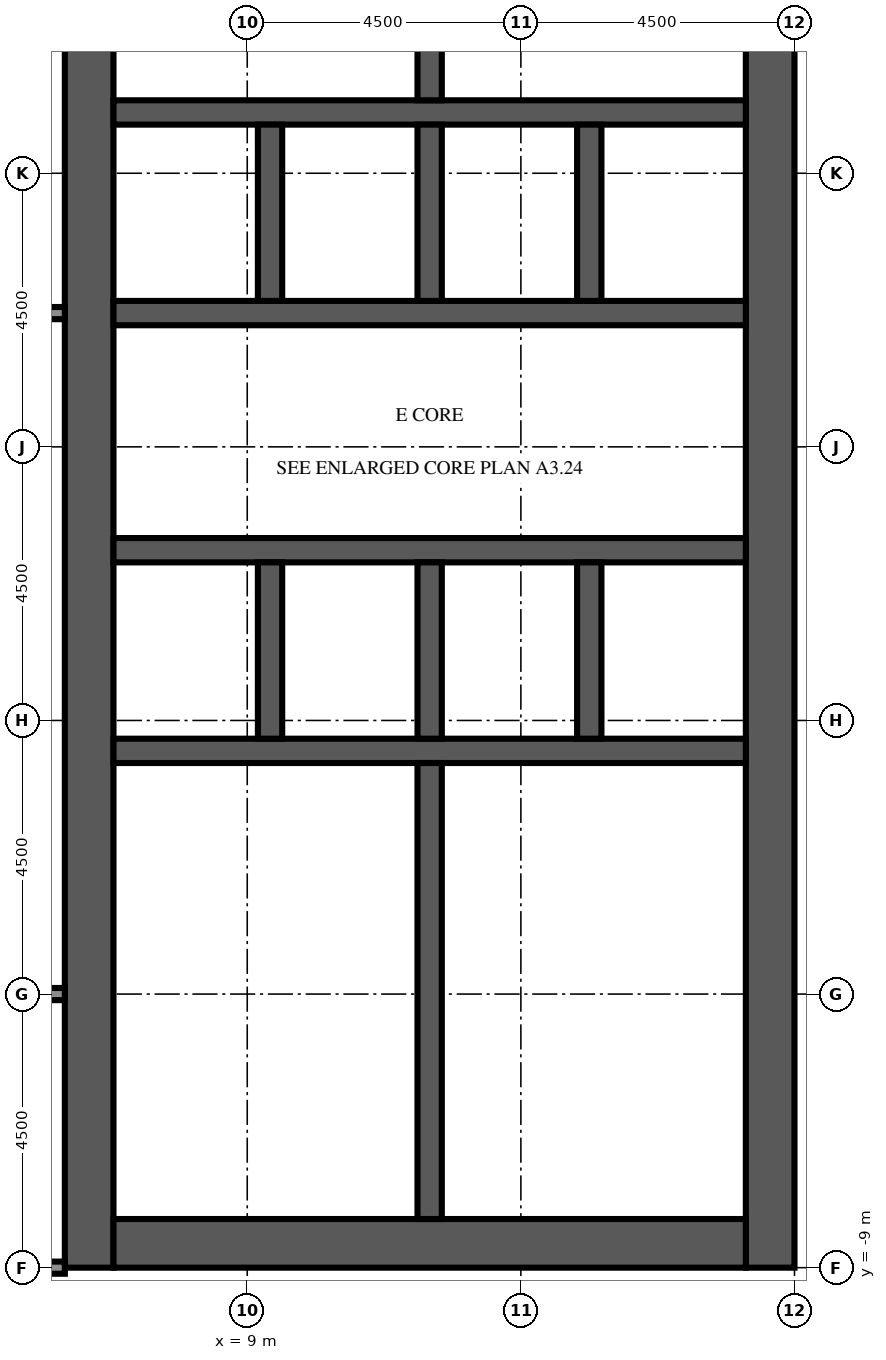
"""IFC4 building model, lengths in metres.
Left out: names, types, materials, properties, quantities, classifications, styles, units other than length and angle.
Written with IfcOpenShell. Run it as: python <this file> out.ifc"""

import sys

from ifc_helpers import new_model, si_unit, direction, frame, frame_2d, origin, place, context, subcontext, project, spatial, rectangle, extrude, element, fill, save


model = new_model("IFC4")
c1 = context("Model", 3, precision=1e-05, world=origin(), true_north=direction((0.0, 1.0)))
c2 = subcontext(c1, "Body", "Model", "MODEL_VIEW")
j1 = project(units=[si_unit("LENGTHUNIT", "METRE"), si_unit("PLANEANGLEUNIT", "RADIAN")], contexts=[c1])
p1 = place(None, origin())
s1 = spatial("IfcSite", under=j1, at=p1, CompositionType="ELEMENT")
p2 = place(p1, origin())
s2 = spatial("IfcBuilding", under=s1, at=p2, CompositionType="ELEMENT")
p3 = place(p2, frame((0.0, 0.0, 151.4)))
s3 = spatial("IfcBuildingStorey", under=s2, at=p3, CompositionType="ELEMENT", Elevation=151.4)
p4 = place(p3, frame((6.4, -9.0, 0.0), z_axis=(0.0, 0.0, 1.0), x_axis=(0.0, 1.0, 0.0)))
e1 = element("IfcWall", 1, at=p4, inside=s3, PredefinedType="SHEAR", context=c2, shape_type="SweptSolid", body=[
    extrude(rectangle(XDim=27.5, YDim=0.8, at=frame_2d((13.75, 0.0))), origin(), (0.0, 0.0, 1.0), 5.4),
])
p5 = place(p4, frame((12.55, 0.0, 0.0)))
e2 = element("IfcOpeningElement", 2, at=p5, cuts=e1, PredefinedType="OPENING", context=c2, shape_type="SweptSolid", body=[
    extrude(rectangle(XDim=2.4, YDim=2.4, at=frame_2d((1.2, 1.2))), frame((0.0, 0.41, 0.0), z_axis=(0.0, -1.0, 0.0), x_axis=(1.0, 0.0, 0.0)), (0.0, 0.0, 1.0), 0.82),
])
p6 = place(p4, frame((5.45, 0.0, 0.0)))
e3 = element("IfcOpeningElement", 3, at=p6, cuts=e1, PredefinedType="OPENING", context=c2, shape_type="SweptSolid", body=[
    extrude(rectangle(XDim=1.2, YDim=2.1, at=frame_2d((0.6, 1.05))), frame((0.0, 0.41, 0.0), z_axis=(0.0, -1.0, 0.0), x_axis=(1.0, 0.0, 0.0)), (0.0, 0.0, 1.0), 0.82),
])
p7 = place(p4, frame((19.45, 0.0, 0.0)))
e4 = element("IfcOpeningElement", 4, at=p7, cuts=e1, PredefinedType="OPENING", context=c2, shape_type="SweptSolid", body=[
    extrude(rectangle(XDim=1.0, YDim=2.1, at=frame_2d((0.5, 1.05))), frame((0.0, 0.41, 0.0), z_axis=(0.0, -1.0, 0.0), x_axis=(1.0, 0.0, 0.0)), (0.0, 0.0, 1.0), 0.82),
])
p8 = place(p4, frame((21.137, 0.0, 0.0)))
e5 = element("IfcOpeningElement", 5, at=p8, cuts=e1, PredefinedType="OPENING", context=c2, shape_type="SweptSolid", body=[
    extrude(rectangle(XDim=1.0, YDim=2.1, at=frame_2d((0.5, 1.05))), frame((0.0, 0.41, 0.0), z_axis=(0.0, -1.0, 0.0), x_axis=(1.0, 0.0, 0.0)), (0.0, 0.0, 1.0), 0.82),
])
p9 = place(p4, frame((23.2, 0.0, 0.0)))
e6 = element("IfcOpeningElement", 6, at=p9, cuts=e1, PredefinedType="OPENING", context=c2, shape_type="SweptSolid", body=[
    extrude(rectangle(XDim=1.0, YDim=2.1, at=frame_2d((0.5, 1.05))), frame((0.0, 0.41, 0.0), z_axis=(0.0, -1.0, 0.0), x_axis=(1.0, 0.0, 0.0)), (0.0, 0.0, 1.0), 0.82),
])
p10 = place(p4, frame((25.262, 0.0, 0.0)))
e7 = element("IfcOpeningElement", 7, at=p10, cuts=e1, PredefinedType="OPENING", context=c2, shape_type="SweptSolid", body=[
    extrude(rectangle(XDim=1.0, YDim=2.1, at=frame_2d((0.5, 1.05))), frame((0.0, 0.41, 0.0), z_axis=(0.0, -1.0, 0.0), x_axis=(1.0, 0.0, 0.0)), (0.0, 0.0, 1.0), 0.82),
])
p11 = place(p3, frame((17.6, -9.0, 0.0), z_axis=(0.0, 0.0, 1.0), x_axis=(0.0, 1.0, 0.0)))
e8 = element("IfcWall", 8, at=p11, inside=s3, PredefinedType="SHEAR", context=c2, shape_type="SweptSolid", body=[
    extrude(rectangle(XDim=27.5, YDim=0.8, at=frame_2d((13.75, 0.0))), origin(), (0.0, 0.0, 1.0), 5.4),
])
p12 = place(p11, frame((12.55, 0.0, 0.0)))
e9 = element("IfcOpeningElement", 9, at=p12, cuts=e8, PredefinedType="OPENING", context=c2, shape_type="SweptSolid", body=[
    extrude(rectangle(XDim=2.4, YDim=2.4, at=frame_2d((1.2, 1.2))), frame((0.0, 0.41, 0.0), z_axis=(0.0, -1.0, 0.0), x_axis=(1.0, 0.0, 0.0)), (0.0, 0.0, 1.0), 0.82),
])
p13 = place(p11, frame((6.825, 0.0, 0.0)))
e10 = element("IfcOpeningElement", 10, at=p13, cuts=e8, PredefinedType="OPENING", context=c2, shape_type="SweptSolid", body=[
    extrude(rectangle(XDim=1.2, YDim=2.1, at=frame_2d((0.6, 1.05))), frame((0.0, 0.41, 0.0), z_axis=(0.0, -1.0, 0.0), x_axis=(1.0, 0.0, 0.0)), (0.0, 0.0, 1.0), 0.82),
])
p14 = place(p11, frame((19.475, 0.0, 0.0)))
e11 = element("IfcOpeningElement", 11, at=p14, cuts=e8, PredefinedType="OPENING", context=c2, shape_type="SweptSolid", body=[
    extrude(rectangle(XDim=1.2, YDim=2.1, at=frame_2d((0.6, 1.05))), frame((0.0, 0.41, 0.0), z_axis=(0.0, -1.0, 0.0), x_axis=(1.0, 0.0, 0.0)), (0.0, 0.0, 1.0), 0.82),
])
p15 = place(p3, frame((6.8, -8.6, 0.0), z_axis=(0.0, 0.0, 1.0), x_axis=(1.0, 0.0, 0.0)))
e12 = element("IfcWall", 12, at=p15, inside=s3, PredefinedType="SHEAR", context=c2, shape_type="SweptSolid", body=[
    extrude(rectangle(XDim=10.4, YDim=0.8, at=frame_2d((5.2, 0.0))), origin(), (0.0, 0.0, 1.0), 5.4),
])
p16 = place(p3, frame((6.8, -0.5, 0.0), z_axis=(0.0, 0.0, 1.0), x_axis=(1.0, 0.0, 0.0)))
e13 = element("IfcWall", 13, at=p16, inside=s3, PredefinedType="SHEAR", context=c2, shape_type="SweptSolid", body=[
    extrude(rectangle(XDim=10.4, YDim=0.4, at=frame_2d((5.2, 0.0))), origin(), (0.0, 0.0, 1.0), 5.4),
])
p17 = place(p3, frame((6.8, 2.8, 0.0), z_axis=(0.0, 0.0, 1.0), x_axis=(1.0, 0.0, 0.0)))
e14 = element("IfcWall", 14, at=p17, inside=s3, PredefinedType="SHEAR", context=c2, shape_type="SweptSolid", body=[
    extrude(rectangle(XDim=10.4, YDim=0.4, at=frame_2d((5.2, 0.0))), origin(), (0.0, 0.0, 1.0), 5.4),
])
p18 = place(p17, frame((0.738, 0.0, 0.0)))
e15 = element("IfcOpeningElement", 15, at=p18, cuts=e14, PredefinedType="OPENING", context=c2, shape_type="SweptSolid", body=[
    extrude(rectangle(XDim=1.1, YDim=2.1, at=frame_2d((0.55, 1.05))), frame((0.0, 0.21, 0.0), z_axis=(0.0, -1.0, 0.0), x_axis=(1.0, 0.0, 0.0)), (0.0, 0.0, 1.0), 0.42),
])
p19 = place(p17, frame((3.337, 0.0, 0.0)))
e16 = element("IfcOpeningElement", 16, at=p19, cuts=e14, PredefinedType="OPENING", context=c2, shape_type="SweptSolid", body=[
    extrude(rectangle(XDim=1.1, YDim=2.1, at=frame_2d((0.55, 1.05))), frame((0.0, 0.21, 0.0), z_axis=(0.0, -1.0, 0.0), x_axis=(1.0, 0.0, 0.0)), (0.0, 0.0, 1.0), 0.42),
])
p20 = place(p17, frame((5.962, 0.0, 0.0)))
e17 = element("IfcOpeningElement", 17, at=p20, cuts=e14, PredefinedType="OPENING", context=c2, shape_type="SweptSolid", body=[
    extrude(rectangle(XDim=1.1, YDim=2.1, at=frame_2d((0.55, 1.05))), frame((0.0, 0.21, 0.0), z_axis=(0.0, -1.0, 0.0), x_axis=(1.0, 0.0, 0.0)), (0.0, 0.0, 1.0), 0.42),
])
p21 = place(p17, frame((8.613, 0.0, 0.0)))
e18 = element("IfcOpeningElement", 18, at=p21, cuts=e14, PredefinedType="OPENING", context=c2, shape_type="SweptSolid", body=[
    extrude(rectangle(XDim=1.0, YDim=2.1, at=frame_2d((0.5, 1.05))), frame((0.0, 0.21, 0.0), z_axis=(0.0, -1.0, 0.0), x_axis=(1.0, 0.0, 0.0)), (0.0, 0.0, 1.0), 0.42),
])
p22 = place(p3, frame((6.8, 6.7, 0.0), z_axis=(0.0, 0.0, 1.0), x_axis=(1.0, 0.0, 0.0)))
e19 = element("IfcWall", 19, at=p22, inside=s3, PredefinedType="SHEAR", context=c2, shape_type="SweptSolid", body=[
    extrude(rectangle(XDim=10.4, YDim=0.4, at=frame_2d((5.2, 0.0))), origin(), (0.0, 0.0, 1.0), 5.4),
])
p23 = place(p22, frame((3.337, 0.0, 0.0)))
e20 = element("IfcOpeningElement", 20, at=p23, cuts=e19, PredefinedType="OPENING", context=c2, shape_type="SweptSolid", body=[
    extrude(rectangle(XDim=1.1, YDim=2.1, at=frame_2d((0.55, 1.05))), frame((0.0, 0.21, 0.0), z_axis=(0.0, -1.0, 0.0), x_axis=(1.0, 0.0, 0.0)), (0.0, 0.0, 1.0), 0.42),
])
p24 = place(p22, frame((5.962, 0.0, 0.0)))
e21 = element("IfcOpeningElement", 21, at=p24, cuts=e19, PredefinedType="OPENING", context=c2, shape_type="SweptSolid", body=[
    extrude(rectangle(XDim=1.1, YDim=2.1, at=frame_2d((0.55, 1.05))), frame((0.0, 0.21, 0.0), z_axis=(0.0, -1.0, 0.0), x_axis=(1.0, 0.0, 0.0)), (0.0, 0.0, 1.0), 0.42),
])
p25 = place(p22, frame((8.663, 0.0, 0.0)))
e22 = element("IfcOpeningElement", 22, at=p25, cuts=e19, PredefinedType="OPENING", context=c2, shape_type="SweptSolid", body=[
    extrude(rectangle(XDim=1.1, YDim=2.1, at=frame_2d((0.55, 1.05))), frame((0.0, 0.21, 0.0), z_axis=(0.0, -1.0, 0.0), x_axis=(1.0, 0.0, 0.0)), (0.0, 0.0, 1.0), 0.42),
])
p26 = place(p22, frame((0.688, 0.0, 0.0)))
e23 = element("IfcOpeningElement", 23, at=p26, cuts=e19, PredefinedType="OPENING", context=c2, shape_type="SweptSolid", body=[
    extrude(rectangle(XDim=1.0, YDim=2.1, at=frame_2d((0.5, 1.05))), frame((0.0, 0.21, 0.0), z_axis=(0.0, -1.0, 0.0), x_axis=(1.0, 0.0, 0.0)), (0.0, 0.0, 1.0), 0.42),
])
p27 = place(p3, frame((6.8, 10.0, 0.0), z_axis=(0.0, 0.0, 1.0), x_axis=(1.0, 0.0, 0.0)))
e24 = element("IfcWall", 24, at=p27, inside=s3, PredefinedType="SHEAR", context=c2, shape_type="SweptSolid", body=[
    extrude(rectangle(XDim=10.4, YDim=0.4, at=frame_2d((5.2, 0.0))), origin(), (0.0, 0.0, 1.0), 5.4),
])
for number, where, z_axis, x_axis in (
    (25, (9.375, -0.3, 0.0), (0.0, 0.0, 1.0), (0.0, 1.0, 0.0)),
    (26, (9.375, 6.9, 0.0), (0.0, 0.0, 1.0), (0.0, 1.0, 0.0)),
    (27, (12.0, -0.3, 0.0), (0.0, 0.0, 1.0), (0.0, 1.0, 0.0)),
    (28, (12.0, 6.9, 0.0), (0.0, 0.0, 1.0), (0.0, 1.0, 0.0)),
    (29, (14.625, -0.3, 0.0), (0.0, 0.0, 1.0), (0.0, 1.0, 0.0)),
    (30, (14.625, 6.9, 0.0), (0.0, 0.0, 1.0), (0.0, 1.0, 0.0)),
):
    element("IfcWall", number, at=place(p3, frame(where, z_axis=z_axis, x_axis=x_axis)), inside=s3, PredefinedType="SHEAR", context=c2, shape_type="SweptSolid", body=[
        extrude(rectangle(XDim=2.9, YDim=0.4, at=frame_2d((1.45, 0.0))), origin(), (0.0, 0.0, 1.0), 5.4),
    ])
for number, where, z_axis, x_axis in (
    (31, (12.0, -8.2, 0.0), (0.0, 0.0, 1.0), (0.0, 1.0, 0.0)),
    (32, (12.0, 10.2, 0.0), (0.0, 0.0, 1.0), (0.0, 1.0, 0.0)),
):
    element("IfcWall", number, at=place(p3, frame(where, z_axis=z_axis, x_axis=x_axis)), inside=s3, PredefinedType="SHEAR", context=c2, shape_type="SweptSolid", body=[
        extrude(rectangle(XDim=7.5, YDim=0.4, at=frame_2d((3.75, 0.0))), origin(), (0.0, 0.0, 1.0), 5.4),
    ])
p28 = place(p3, frame((6.8, -5.2, 0.0), z_axis=(0.0, 0.0, 1.0), x_axis=(1.0, 0.0, 0.0)))
e33 = element("IfcWall", 33, at=p28, inside=s3, PredefinedType="PARTITIONING", context=c2, shape_type="SweptSolid", body=[
    extrude(rectangle(XDim=1.5, YDim=0.1, at=frame_2d((0.75, 0.0))), origin(), (0.0, 0.0, 1.0), 4.95),
])
p29 = place(p28, frame((0.25, 0.0, 0.0)))
e34 = element("IfcOpeningElement", 34, at=p29, cuts=e33, PredefinedType="OPENING", context=c2, shape_type="SweptSolid", body=[
    extrude(rectangle(XDim=1.0, YDim=2.1, at=frame_2d((0.5, 1.05))), frame((0.0, 0.06, 0.0), z_axis=(0.0, -1.0, 0.0), x_axis=(1.0, 0.0, 0.0)), (0.0, 0.0, 1.0), 0.12),
])
p30 = place(p3, frame((8.3, -5.2, 0.0), z_axis=(0.0, 0.0, 1.0), x_axis=(0.0, 1.0, 0.0)))
e35 = element("IfcWall", 35, at=p30, inside=s3, PredefinedType="PARTITIONING", context=c2, shape_type="SweptSolid", body=[
    extrude(rectangle(XDim=2.25, YDim=0.1, at=frame_2d((1.125, 0.0))), origin(), (0.0, 0.0, 1.0), 4.95),
])
p31 = place(p30, frame((0.625, 0.0, 0.0)))
e36 = element("IfcOpeningElement", 36, at=p31, cuts=e35, PredefinedType="OPENING", context=c2, shape_type="SweptSolid", body=[
    extrude(rectangle(XDim=1.0, YDim=2.1, at=frame_2d((0.5, 1.05))), frame((0.0, 0.06, 0.0), z_axis=(0.0, -1.0, 0.0), x_axis=(1.0, 0.0, 0.0)), (0.0, 0.0, 1.0), 0.12),
])
p32 = place(p3, frame((8.3, -2.95, 0.0), z_axis=(0.0, 0.0, 1.0), x_axis=(0.0, 1.0, 0.0)))
e37 = element("IfcWall", 37, at=p32, inside=s3, PredefinedType="PARTITIONING", context=c2, shape_type="SweptSolid", body=[
    extrude(rectangle(XDim=2.25, YDim=0.1, at=frame_2d((1.125, 0.0))), origin(), (0.0, 0.0, 1.0), 4.95),
])
p33 = place(p32, frame((0.625, 0.0, 0.0)))
e38 = element("IfcOpeningElement", 38, at=p33, cuts=e37, PredefinedType="OPENING", context=c2, shape_type="SweptSolid", body=[
    extrude(rectangle(XDim=1.0, YDim=2.1, at=frame_2d((0.5, 1.05))), frame((0.0, 0.06, 0.0), z_axis=(0.0, -1.0, 0.0), x_axis=(1.0, 0.0, 0.0)), (0.0, 0.0, 1.0), 0.12),
])
for number, where, z_axis, x_axis in (
    (39, (8.3, -5.2, 0.0), (0.0, 0.0, 1.0), (1.0, 0.0, 0.0)),
    (40, (8.3, -2.95, 0.0), (0.0, 0.0, 1.0), (1.0, 0.0, 0.0)),
):
    element("IfcWall", number, at=place(p3, frame(where, z_axis=z_axis, x_axis=x_axis)), inside=s3, PredefinedType="PARTITIONING", context=c2, shape_type="SweptSolid", body=[
        extrude(rectangle(XDim=3.5, YDim=0.1, at=frame_2d((1.75, 0.0))), origin(), (0.0, 0.0, 1.0), 4.95),
    ])
p34 = place(p3, frame((1.5, -9.0, 0.0), z_axis=(0.0, 0.0, 1.0), x_axis=(1.0, 0.0, 0.0)))
e41 = element("IfcWall", 41, at=p34, inside=s3, PredefinedType="PARTITIONING", context=c2, shape_type="SweptSolid", body=[
    extrude(rectangle(XDim=4.5, YDim=0.2, at=frame_2d((2.25, 0.0))), origin(), (0.0, 0.0, 1.0), 4.95),
])
p35 = place(p34, frame((1.85, 0.0, 0.0)))
e42 = element("IfcOpeningElement", 42, at=p35, cuts=e41, PredefinedType="OPENING", context=c2, shape_type="SweptSolid", body=[
    extrude(rectangle(XDim=1.0, YDim=2.1, at=frame_2d((0.5, 1.05))), frame((0.0, 0.11, 0.0), z_axis=(0.0, -1.0, 0.0), x_axis=(1.0, 0.0, 0.0)), (0.0, 0.0, 1.0), 0.22),
])
p36 = place(p3, frame((1.5, -4.5, 0.0), z_axis=(0.0, 0.0, 1.0), x_axis=(1.0, 0.0, 0.0)))
e43 = element("IfcWall", 43, at=p36, inside=s3, PredefinedType="PARTITIONING", context=c2, shape_type="SweptSolid", body=[
    extrude(rectangle(XDim=4.5, YDim=0.2, at=frame_2d((2.25, 0.0))), origin(), (0.0, 0.0, 1.0), 4.95),
])
p37 = place(p3, frame((1.5, 6.7, 0.0), z_axis=(0.0, 0.0, 1.0), x_axis=(1.0, 0.0, 0.0)))
e44 = element("IfcWall", 44, at=p37, inside=s3, PredefinedType="PARTITIONING", context=c2, shape_type="SweptSolid", body=[
    extrude(rectangle(XDim=4.5, YDim=0.2, at=frame_2d((2.25, 0.0))), origin(), (0.0, 0.0, 1.0), 4.95),
])
p38 = place(p37, frame((1.85, 0.0, 0.0)))
e45 = element("IfcOpeningElement", 45, at=p38, cuts=e44, PredefinedType="OPENING", context=c2, shape_type="SweptSolid", body=[
    extrude(rectangle(XDim=1.0, YDim=2.1, at=frame_2d((0.5, 1.05))), frame((0.0, 0.11, 0.0), z_axis=(0.0, -1.0, 0.0), x_axis=(1.0, 0.0, 0.0)), (0.0, 0.0, 1.0), 0.22),
])
p39 = place(p18, origin())
e46 = element("IfcDoor", 46, at=p39, inside=s3, OperationType="DOUBLE_DOOR_SLIDING", PredefinedType="DOOR", context=c2, shape_type="SweptSolid", body=[
    extrude(rectangle(XDim=1.1, YDim=2.1, at=frame_2d((0.55, 1.05))), frame((0.0, 0.025, 0.0), z_axis=(0.0, -1.0, 0.0), x_axis=(1.0, 0.0, 0.0)), (0.0, 0.0, 1.0), 0.05),
])
fill(e15, e46)
p40 = place(p19, origin())
e47 = element("IfcDoor", 47, at=p40, inside=s3, OperationType="DOUBLE_DOOR_SLIDING", PredefinedType="DOOR", context=c2, shape_type="SweptSolid", body=[
    extrude(rectangle(XDim=1.1, YDim=2.1, at=frame_2d((0.55, 1.05))), frame((0.0, 0.025, 0.0), z_axis=(0.0, -1.0, 0.0), x_axis=(1.0, 0.0, 0.0)), (0.0, 0.0, 1.0), 0.05),
])
fill(e16, e47)
p41 = place(p20, origin())
e48 = element("IfcDoor", 48, at=p41, inside=s3, OperationType="DOUBLE_DOOR_SLIDING", PredefinedType="DOOR", context=c2, shape_type="SweptSolid", body=[
    extrude(rectangle(XDim=1.1, YDim=2.1, at=frame_2d((0.55, 1.05))), frame((0.0, 0.025, 0.0), z_axis=(0.0, -1.0, 0.0), x_axis=(1.0, 0.0, 0.0)), (0.0, 0.0, 1.0), 0.05),
])
fill(e17, e48)
p42 = place(p23, origin())
e49 = element("IfcDoor", 49, at=p42, inside=s3, OperationType="DOUBLE_DOOR_SLIDING", PredefinedType="DOOR", context=c2, shape_type="SweptSolid", body=[
    extrude(rectangle(XDim=1.1, YDim=2.1, at=frame_2d((0.55, 1.05))), frame((0.0, 0.025, 0.0), z_axis=(0.0, -1.0, 0.0), x_axis=(1.0, 0.0, 0.0)), (0.0, 0.0, 1.0), 0.05),
])
fill(e20, e49)
p43 = place(p24, origin())
e50 = element("IfcDoor", 50, at=p43, inside=s3, OperationType="DOUBLE_DOOR_SLIDING", PredefinedType="DOOR", context=c2, shape_type="SweptSolid", body=[
    extrude(rectangle(XDim=1.1, YDim=2.1, at=frame_2d((0.55, 1.05))), frame((0.0, 0.025, 0.0), z_axis=(0.0, -1.0, 0.0), x_axis=(1.0, 0.0, 0.0)), (0.0, 0.0, 1.0), 0.05),
])
fill(e21, e50)
p44 = place(p25, origin())
e51 = element("IfcDoor", 51, at=p44, inside=s3, OperationType="DOUBLE_DOOR_SLIDING", PredefinedType="DOOR", context=c2, shape_type="SweptSolid", body=[
    extrude(rectangle(XDim=1.1, YDim=2.1, at=frame_2d((0.55, 1.05))), frame((0.0, 0.025, 0.0), z_axis=(0.0, -1.0, 0.0), x_axis=(1.0, 0.0, 0.0)), (0.0, 0.0, 1.0), 0.05),
])
fill(e22, e51)
p45 = place(p5, origin())
e52 = element("IfcDoor", 52, at=p45, inside=s3, OperationType="DOUBLE_DOOR_DOUBLE_SWING", PredefinedType="DOOR", context=c2, shape_type="SweptSolid", body=[
    extrude(rectangle(XDim=2.4, YDim=2.4, at=frame_2d((1.2, 1.2))), frame((0.0, 0.025, 0.0), z_axis=(0.0, -1.0, 0.0), x_axis=(1.0, 0.0, 0.0)), (0.0, 0.0, 1.0), 0.05),
])
fill(e2, e52)
p46 = place(p12, origin())
e53 = element("IfcDoor", 53, at=p46, inside=s3, OperationType="DOUBLE_DOOR_DOUBLE_SWING", PredefinedType="DOOR", context=c2, shape_type="SweptSolid", body=[
    extrude(rectangle(XDim=2.4, YDim=2.4, at=frame_2d((1.2, 1.2))), frame((0.0, 0.025, 0.0), z_axis=(0.0, -1.0, 0.0), x_axis=(1.0, 0.0, 0.0)), (0.0, 0.0, 1.0), 0.05),
])
fill(e9, e53)
p47 = place(p13, frame((1.2, 0.0, 0.0), z_axis=(0.0, 0.0, 1.0), x_axis=(-1.0, 0.0, 0.0)))
e54 = element("IfcDoor", 54, at=p47, inside=s3, OperationType="SINGLE_SWING_LEFT", PredefinedType="DOOR", context=c2, shape_type="SweptSolid", body=[
    extrude(rectangle(XDim=1.2, YDim=2.1, at=frame_2d((0.6, 1.05))), frame((0.0, 0.025, 0.0), z_axis=(0.0, -1.0, 0.0), x_axis=(1.0, 0.0, 0.0)), (0.0, 0.0, 1.0), 0.05),
])
fill(e10, e54)
p48 = place(p14, frame((1.2, 0.0, 0.0), z_axis=(0.0, 0.0, 1.0), x_axis=(-1.0, 0.0, 0.0)))
e55 = element("IfcDoor", 55, at=p48, inside=s3, OperationType="SINGLE_SWING_LEFT", PredefinedType="DOOR", context=c2, shape_type="SweptSolid", body=[
    extrude(rectangle(XDim=1.2, YDim=2.1, at=frame_2d((0.6, 1.05))), frame((0.0, 0.025, 0.0), z_axis=(0.0, -1.0, 0.0), x_axis=(1.0, 0.0, 0.0)), (0.0, 0.0, 1.0), 0.05),
])
fill(e11, e55)
p49 = place(p21, origin())
e56 = element("IfcDoor", 56, at=p49, inside=s3, OperationType="SINGLE_SWING_RIGHT", PredefinedType="DOOR", context=c2, shape_type="SweptSolid", body=[
    extrude(rectangle(XDim=1.0, YDim=2.1, at=frame_2d((0.5, 1.05))), frame((0.0, 0.025, 0.0), z_axis=(0.0, -1.0, 0.0), x_axis=(1.0, 0.0, 0.0)), (0.0, 0.0, 1.0), 0.05),
])
fill(e18, e56)
p50 = place(p26, origin())
e57 = element("IfcDoor", 57, at=p50, inside=s3, OperationType="SINGLE_SWING_LEFT", PredefinedType="DOOR", context=c2, shape_type="SweptSolid", body=[
    extrude(rectangle(XDim=1.0, YDim=2.1, at=frame_2d((0.5, 1.05))), frame((0.0, 0.025, 0.0), z_axis=(0.0, -1.0, 0.0), x_axis=(1.0, 0.0, 0.0)), (0.0, 0.0, 1.0), 0.05),
])
fill(e23, e57)
p51 = place(p6, origin())
e58 = element("IfcDoor", 58, at=p51, inside=s3, OperationType="SINGLE_SWING_RIGHT", PredefinedType="DOOR", context=c2, shape_type="SweptSolid", body=[
    extrude(rectangle(XDim=1.2, YDim=2.1, at=frame_2d((0.6, 1.05))), frame((0.0, -0.325, 0.0), z_axis=(0.0, -1.0, 0.0), x_axis=(1.0, 0.0, 0.0)), (0.0, 0.0, 1.0), 0.05),
])
fill(e3, e58)
p52 = place(p29, origin())
e59 = element("IfcDoor", 59, at=p52, inside=s3, OperationType="SINGLE_SWING_LEFT", PredefinedType="DOOR", context=c2, shape_type="SweptSolid", body=[
    extrude(rectangle(XDim=1.0, YDim=2.1, at=frame_2d((0.5, 1.05))), frame((0.0, 0.025, 0.0), z_axis=(0.0, -1.0, 0.0), x_axis=(1.0, 0.0, 0.0)), (0.0, 0.0, 1.0), 0.05),
])
fill(e34, e59)
p53 = place(p31, origin())
e60 = element("IfcDoor", 60, at=p53, inside=s3, OperationType="SINGLE_SWING_RIGHT", PredefinedType="DOOR", context=c2, shape_type="SweptSolid", body=[
    extrude(rectangle(XDim=1.0, YDim=2.1, at=frame_2d((0.5, 1.05))), frame((0.0, 0.025, 0.0), z_axis=(0.0, -1.0, 0.0), x_axis=(1.0, 0.0, 0.0)), (0.0, 0.0, 1.0), 0.05),
])
fill(e36, e60)
p54 = place(p33, origin())
e61 = element("IfcDoor", 61, at=p54, inside=s3, OperationType="SINGLE_SWING_LEFT", PredefinedType="DOOR", context=c2, shape_type="SweptSolid", body=[
    extrude(rectangle(XDim=1.0, YDim=2.1, at=frame_2d((0.5, 1.05))), frame((0.0, 0.025, 0.0), z_axis=(0.0, -1.0, 0.0), x_axis=(1.0, 0.0, 0.0)), (0.0, 0.0, 1.0), 0.05),
])
fill(e38, e61)
p55 = place(p7, origin())
e62 = element("IfcDoor", 62, at=p55, inside=s3, OperationType="SINGLE_SWING_RIGHT", PredefinedType="DOOR", context=c2, shape_type="SweptSolid", body=[
    extrude(rectangle(XDim=1.0, YDim=2.1, at=frame_2d((0.5, 1.05))), frame((0.0, -0.325, 0.0), z_axis=(0.0, -1.0, 0.0), x_axis=(1.0, 0.0, 0.0)), (0.0, 0.0, 1.0), 0.05),
])
fill(e4, e62)
save(model, sys.argv[1])
